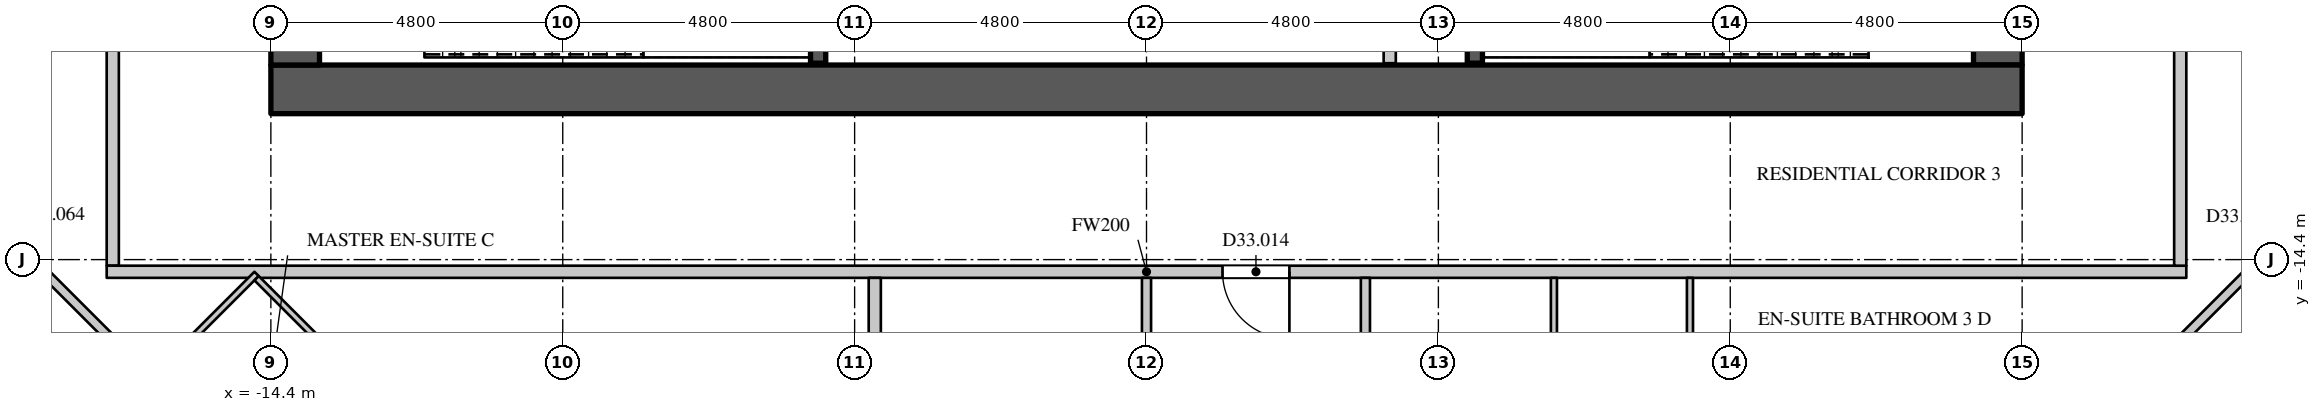
"""IFC4 building model, lengths in metres.
Left out: names, types, materials, properties, quantities, classifications, styles, units other than length and angle.
Written with IfcOpenShell. Run it as: python <this file> out.ifc"""

import sys

from ifc_helpers import new_model, si_unit, direction, frame, frame_2d, origin, place, context, subcontext, project, spatial, rectangle, extrude, element, fill, save


model = new_model("IFC4")
c1 = context("Model", 3, precision=1e-05, world=origin(), true_north=direction((0.0, 1.0)))
c2 = subcontext(c1, "Body", "Model", "MODEL_VIEW")
j1 = project(units=[si_unit("LENGTHUNIT", "METRE"), si_unit("PLANEANGLEUNIT", "RADIAN")], contexts=[c1])
p1 = place(None, origin())
s1 = spatial("IfcSite", under=j1, at=p1, CompositionType="ELEMENT")
p2 = place(p1, origin())
s2 = spatial("IfcBuilding", under=s1, at=p2, CompositionType="ELEMENT")
p3 = place(p2, frame((0.0, 0.0, 144.3)))
s3 = spatial("IfcBuildingStorey", under=s2, at=p3, CompositionType="ELEMENT", Elevation=144.3)
p4 = place(p3, frame((-14.4, -11.6, 0.0), z_axis=(0.0, 0.0, 1.0), x_axis=(1.0, 0.0, 0.0)))
e1 = element("IfcWall", 1, at=p4, inside=s3, PredefinedType="SHEAR", context=c2, shape_type="SweptSolid", body=[
    extrude(rectangle(XDim=28.8, YDim=0.8, at=frame_2d((14.4, 0.0))), origin(), (0.0, 0.0, 1.0), 4.2),
])
p5 = place(p3, frame((14.0, -11.2, 0.0), z_axis=(0.0, 0.0, 1.0), x_axis=(0.0, 1.0, 0.0)))
e2 = element("IfcWall", 2, at=p5, inside=s3, PredefinedType="SHEAR", context=c2, shape_type="SweptSolid", body=[
    extrude(rectangle(XDim=22.4, YDim=0.8, at=frame_2d((11.2, 0.0))), origin(), (0.0, 0.0, 1.0), 4.2),
])
p6 = place(p5, frame((20.25, 0.0, 0.0)))
e3 = element("IfcOpeningElement", 3, at=p6, cuts=e2, PredefinedType="OPENING", context=c2, shape_type="SweptSolid", body=[
    extrude(rectangle(XDim=1.1, YDim=2.2, at=frame_2d((0.55, 1.1))), frame((0.0, 0.41, 0.0), z_axis=(0.0, -1.0, 0.0), x_axis=(1.0, 0.0, 0.0)), (0.0, 0.0, 1.0), 0.82),
])
p7 = place(p5, frame((1.05, 0.0, 0.0)))
e4 = element("IfcOpeningElement", 4, at=p7, cuts=e2, PredefinedType="OPENING", context=c2, shape_type="SweptSolid", body=[
    extrude(rectangle(XDim=1.1, YDim=2.2, at=frame_2d((0.55, 1.1))), frame((0.0, 0.41, 0.0), z_axis=(0.0, -1.0, 0.0), x_axis=(1.0, 0.0, 0.0)), (0.0, 0.0, 1.0), 0.82),
])
p8 = place(p5, frame((14.75, 0.0, 0.0)))
e5 = element("IfcOpeningElement", 5, at=p8, cuts=e2, PredefinedType="OPENING", context=c2, shape_type="SweptSolid", body=[
    extrude(rectangle(XDim=1.5, YDim=2.4, at=frame_2d((0.75, 1.2))), frame((0.0, 0.41, 0.0), z_axis=(0.0, -1.0, 0.0), x_axis=(1.0, 0.0, 0.0)), (0.0, 0.0, 1.0), 0.82),
])
p9 = place(p5, frame((6.15, 0.0, 0.0)))
e6 = element("IfcOpeningElement", 6, at=p9, cuts=e2, PredefinedType="OPENING", context=c2, shape_type="SweptSolid", body=[
    extrude(rectangle(XDim=1.5, YDim=2.4, at=frame_2d((0.75, 1.2))), frame((0.0, 0.41, 0.0), z_axis=(0.0, -1.0, 0.0), x_axis=(1.0, 0.0, 0.0)), (0.0, 0.0, 1.0), 0.82),
])
p10 = place(p3, frame((-14.0, -11.2, 0.0), z_axis=(0.0, 0.0, 1.0), x_axis=(0.0, 1.0, 0.0)))
e7 = element("IfcWall", 7, at=p10, inside=s3, PredefinedType="SHEAR", context=c2, shape_type="SweptSolid", body=[
    extrude(rectangle(XDim=22.4, YDim=0.8, at=frame_2d((11.2, 0.0))), origin(), (0.0, 0.0, 1.0), 4.2),
])
p11 = place(p10, frame((20.25, 0.0, 0.0)))
e8 = element("IfcOpeningElement", 8, at=p11, cuts=e7, PredefinedType="OPENING", context=c2, shape_type="SweptSolid", body=[
    extrude(rectangle(XDim=1.1, YDim=2.2, at=frame_2d((0.55, 1.1))), frame((0.0, 0.41, 0.0), z_axis=(0.0, -1.0, 0.0), x_axis=(1.0, 0.0, 0.0)), (0.0, 0.0, 1.0), 0.82),
])
p12 = place(p10, frame((1.05, 0.0, 0.0)))
e9 = element("IfcOpeningElement", 9, at=p12, cuts=e7, PredefinedType="OPENING", context=c2, shape_type="SweptSolid", body=[
    extrude(rectangle(XDim=1.1, YDim=2.2, at=frame_2d((0.55, 1.1))), frame((0.0, 0.41, 0.0), z_axis=(0.0, -1.0, 0.0), x_axis=(1.0, 0.0, 0.0)), (0.0, 0.0, 1.0), 0.82),
])
p13 = place(p10, frame((15.95, 0.0, 0.0)))
e10 = element("IfcOpeningElement", 10, at=p13, cuts=e7, PredefinedType="OPENING", context=c2, shape_type="SweptSolid", body=[
    extrude(rectangle(XDim=1.5, YDim=2.4, at=frame_2d((0.75, 1.2))), frame((0.0, 0.41, 0.0), z_axis=(0.0, -1.0, 0.0), x_axis=(1.0, 0.0, 0.0)), (0.0, 0.0, 1.0), 0.82),
])
p14 = place(p10, frame((4.95, 0.0, 0.0)))
e11 = element("IfcOpeningElement", 11, at=p14, cuts=e7, PredefinedType="OPENING", context=c2, shape_type="SweptSolid", body=[
    extrude(rectangle(XDim=1.5, YDim=2.4, at=frame_2d((0.75, 1.2))), frame((0.0, 0.41, 0.0), z_axis=(0.0, -1.0, 0.0), x_axis=(1.0, 0.0, 0.0)), (0.0, 0.0, 1.0), 0.82),
])
p15 = place(p3, frame((-17.0, -14.5, 0.0), z_axis=(0.0, 0.0, 1.0), x_axis=(0.0, 1.0, 0.0)))
e12 = element("IfcWall", 12, at=p15, inside=s3, PredefinedType="PARTITIONING", context=c2, shape_type="SweptSolid", body=[
    extrude(rectangle(XDim=29.0, YDim=0.2, at=frame_2d((14.5, 0.0))), origin(), (0.0, 0.0, 1.0), 3.798),
])
p16 = place(p15, frame((13.9, 0.0, 0.0)))
e13 = element("IfcOpeningElement", 13, at=p16, cuts=e12, PredefinedType="OPENING", context=c2, shape_type="SweptSolid", body=[
    extrude(rectangle(XDim=1.1, YDim=2.4, at=frame_2d((0.55, 1.2))), frame((0.0, 0.11, 0.0), z_axis=(0.0, -1.0, 0.0), x_axis=(1.0, 0.0, 0.0)), (0.0, 0.0, 1.0), 0.22),
])
p17 = place(p3, frame((-17.1, -14.6, 0.0), z_axis=(0.0, 0.0, 1.0), x_axis=(1.0, 0.0, 0.0)))
e14 = element("IfcWall", 14, at=p17, inside=s3, PredefinedType="PARTITIONING", context=c2, shape_type="SweptSolid", body=[
    extrude(rectangle(XDim=34.2, YDim=0.2, at=frame_2d((17.1, 0.0))), origin(), (0.0, 0.0, 1.0), 3.798),
])
p18 = place(p17, frame((18.35, 0.0, 0.0)))
e15 = element("IfcOpeningElement", 15, at=p18, cuts=e14, PredefinedType="OPENING", context=c2, shape_type="SweptSolid", body=[
    extrude(rectangle(XDim=1.1, YDim=2.4, at=frame_2d((0.55, 1.2))), frame((0.0, 0.11, 0.0), z_axis=(0.0, -1.0, 0.0), x_axis=(1.0, 0.0, 0.0)), (0.0, 0.0, 1.0), 0.22),
])
p19 = place(p3, frame((17.0, -14.5, 0.0), z_axis=(0.0, 0.0, 1.0), x_axis=(0.0, 1.0, 0.0)))
e16 = element("IfcWall", 16, at=p19, inside=s3, PredefinedType="PARTITIONING", context=c2, shape_type="SweptSolid", body=[
    extrude(rectangle(XDim=29.0, YDim=0.2, at=frame_2d((14.5, 0.0))), origin(), (0.0, 0.0, 1.0), 3.798),
])
p20 = place(p19, frame((15.9, 0.0, 0.0)))
e17 = element("IfcOpeningElement", 17, at=p20, cuts=e16, PredefinedType="OPENING", context=c2, shape_type="SweptSolid", body=[
    extrude(rectangle(XDim=1.1, YDim=2.4, at=frame_2d((0.55, 1.2))), frame((0.0, 0.11, 0.0), z_axis=(0.0, -1.0, 0.0), x_axis=(1.0, 0.0, 0.0)), (0.0, 0.0, 1.0), 0.22),
])
p21 = place(p3, frame((-21.347, -11.388, 0.0), z_axis=(0.0, 0.0, 1.0), x_axis=(0.707106781187, -0.707106781187, 0.0)))
e18 = element("IfcWall", 18, at=p21, inside=s3, PredefinedType="PARTITIONING", context=c2, shape_type="SweptSolid", body=[
    extrude(rectangle(XDim=6.967, YDim=0.15, at=frame_2d((3.483, 0.0))), origin(), (0.0, 0.0, 1.0), 3.798),
])
p22 = place(p21, frame((2.75, 0.0, 0.0)))
e19 = element("IfcOpeningElement", 19, at=p22, cuts=e18, PredefinedType="OPENING", context=c2, shape_type="SweptSolid", body=[
    extrude(rectangle(XDim=0.95, YDim=2.2, at=frame_2d((0.475, 1.1))), frame((0.0, 0.085, 0.0), z_axis=(0.0, -1.0, 0.0), x_axis=(1.0, 0.0, 0.0)), (0.0, 0.0, 1.0), 0.17),
])
p23 = place(p3, frame((0.0, -26.455, 0.0), z_axis=(0.0, 0.0, 1.0), x_axis=(0.0, 1.0, 0.0)))
e20 = element("IfcWall", 20, at=p23, inside=s3, PredefinedType="PARTITIONING", context=c2, shape_type="SweptSolid", body=[
    extrude(rectangle(XDim=11.755, YDim=0.15, at=frame_2d((5.877, 0.0))), origin(), (0.0, 0.0, 1.0), 3.798),
])
p24 = place(p23, frame((8.3, 0.0, 0.0)))
e21 = element("IfcOpeningElement", 21, at=p24, cuts=e20, PredefinedType="OPENING", context=c2, shape_type="SweptSolid", body=[
    extrude(rectangle(XDim=0.95, YDim=2.2, at=frame_2d((0.475, 1.1))), frame((0.0, 0.085, 0.0), z_axis=(0.0, -1.0, 0.0), x_axis=(1.0, 0.0, 0.0)), (0.0, 0.0, 1.0), 0.17),
])
p25 = place(p3, frame((3.6, -20.725, 0.0), z_axis=(0.0, 0.0, 1.0), x_axis=(0.0, 1.0, 0.0)))
e22 = element("IfcWall", 22, at=p25, inside=s3, PredefinedType="PARTITIONING", context=c2, shape_type="SweptSolid", body=[
    extrude(rectangle(XDim=6.025, YDim=0.15, at=frame_2d((3.013, 0.0))), origin(), (0.0, 0.0, 1.0), 3.798),
])
p26 = place(p25, frame((2.55, 0.0, 0.0)))
e23 = element("IfcOpeningElement", 23, at=p26, cuts=e22, PredefinedType="OPENING", context=c2, shape_type="SweptSolid", body=[
    extrude(rectangle(XDim=0.95, YDim=2.2, at=frame_2d((0.475, 1.1))), frame((0.0, 0.085, 0.0), z_axis=(0.0, -1.0, 0.0), x_axis=(1.0, 0.0, 0.0)), (0.0, 0.0, 1.0), 0.17),
])
p27 = place(p3, frame((15.099, -17.636, 0.0), z_axis=(0.0, 0.0, 1.0), x_axis=(0.707106781187, 0.707106781187, 0.0)))
e24 = element("IfcWall", 24, at=p27, inside=s3, PredefinedType="PARTITIONING", context=c2, shape_type="SweptSolid", body=[
    extrude(rectangle(XDim=8.986, YDim=0.15, at=frame_2d((4.493, 0.0))), origin(), (0.0, 0.0, 1.0), 3.798),
])
p28 = place(p27, frame((0.4, 0.0, 0.0)))
e25 = element("IfcOpeningElement", 25, at=p28, cuts=e24, PredefinedType="OPENING", context=c2, shape_type="SweptSolid", body=[
    extrude(rectangle(XDim=0.95, YDim=2.2, at=frame_2d((0.475, 1.1))), frame((0.0, 0.085, 0.0), z_axis=(0.0, -1.0, 0.0), x_axis=(1.0, 0.0, 0.0)), (0.0, 0.0, 1.0), 0.17),
])
p29 = place(p27, frame((5.1, 0.0, 0.0)))
e26 = element("IfcOpeningElement", 26, at=p29, cuts=e24, PredefinedType="OPENING", context=c2, shape_type="SweptSolid", body=[
    extrude(rectangle(XDim=0.95, YDim=2.2, at=frame_2d((0.475, 1.1))), frame((0.0, 0.085, 0.0), z_axis=(0.0, -1.0, 0.0), x_axis=(1.0, 0.0, 0.0)), (0.0, 0.0, 1.0), 0.17),
])
p30 = place(p27, frame((7.85, 0.0, 0.0)))
e27 = element("IfcOpeningElement", 27, at=p30, cuts=e24, PredefinedType="OPENING", context=c2, shape_type="SweptSolid", body=[
    extrude(rectangle(XDim=0.95, YDim=2.2, at=frame_2d((0.475, 1.1))), frame((0.0, 0.085, 0.0), z_axis=(0.0, -1.0, 0.0), x_axis=(1.0, 0.0, 0.0)), (0.0, 0.0, 1.0), 0.17),
])
p31 = place(p3, frame((-4.469, -25.65, 0.0), z_axis=(0.0, 0.0, 1.0), x_axis=(0.0, 1.0, 0.0)))
e28 = element("IfcWall", 28, at=p31, inside=s3, PredefinedType="PARTITIONING", context=c2, shape_type="SweptSolid", body=[
    extrude(rectangle(XDim=10.95, YDim=0.2, at=frame_2d((5.475, 0.0))), origin(), (0.0, 0.0, 1.0), 3.15),
])
p32 = place(p3, frame((4.0, -11.17, 0.0), z_axis=(0.0, 0.0, 1.0), x_axis=(0.0, 1.0, 0.0)))
e29 = element("IfcWall", 29, at=p32, inside=s3, PredefinedType="PARTITIONING", context=c2, shape_type="SweptSolid", body=[
    extrude(rectangle(XDim=5.27, YDim=0.2, at=frame_2d((2.635, 0.0))), origin(), (0.0, 0.0, 1.0), 3.798),
])
for number, where, z_axis, x_axis in (
    (30, (-5.4, -11.17, 0.0), (0.0, 0.0, 1.0), (0.0, 1.0, 0.0)),
    (31, (5.4, -11.17, 0.0), (0.0, 0.0, 1.0), (0.0, 1.0, 0.0)),
):
    element("IfcWall", number, at=place(p3, frame(where, z_axis=z_axis, x_axis=x_axis)), inside=s3, PredefinedType="SHEAR", context=c2, shape_type="SweptSolid", body=[
        extrude(rectangle(XDim=2.845, YDim=0.25, at=frame_2d((1.422, 0.0))), origin(), (0.0, 0.0, 1.0), 3.798),
    ])
p33 = place(p3, frame((-15.929, -15.929, 0.0), z_axis=(0.0, 0.0, 1.0), x_axis=(0.707106781187, 0.707106781187, 0.0)))
e32 = element("IfcWall", 32, at=p33, inside=s3, PredefinedType="PARTITIONING", context=c2, shape_type="SweptSolid", body=[
    extrude(rectangle(XDim=1.83, YDim=0.1, at=frame_2d((0.915, 0.0))), origin(), (0.0, 0.0, 1.0), 3.798),
])
p34 = place(p3, frame((-14.635, -14.706, 0.0), z_axis=(0.0, 0.0, 1.0), x_axis=(0.707106781187, -0.707106781187, 0.0)))
e33 = element("IfcWall", 33, at=p34, inside=s3, PredefinedType="PARTITIONING", context=c2, shape_type="SweptSolid", body=[
    extrude(rectangle(XDim=2.6, YDim=0.1, at=frame_2d((1.3, 0.0))), origin(), (0.0, 0.0, 1.0), 3.798),
])
p35 = place(p3, frame((6.7, -20.725, 0.0), z_axis=(0.0, 0.0, 1.0), x_axis=(0.0, 1.0, 0.0)))
e34 = element("IfcWall", 34, at=p35, inside=s3, PredefinedType="PARTITIONING", context=c2, shape_type="SweptSolid", body=[
    extrude(rectangle(XDim=6.025, YDim=0.1, at=frame_2d((3.013, 0.0))), origin(), (0.0, 0.0, 1.0), 3.798),
])
p36 = place(p3, frame((8.937, -20.82, 0.0), z_axis=(0.0, 0.0, 1.0), x_axis=(0.0, 1.0, 0.0)))
e35 = element("IfcWall", 35, at=p36, inside=s3, PredefinedType="PARTITIONING", context=c2, shape_type="SweptSolid", body=[
    extrude(rectangle(XDim=6.12, YDim=0.1, at=frame_2d((3.06, 0.0))), origin(), (0.0, 0.0, 1.0), 3.798),
])
p37 = place(p36, frame((2.65, 0.0, 0.0)))
e36 = element("IfcOpeningElement", 36, at=p37, cuts=e35, PredefinedType="OPENING", context=c2, shape_type="SweptSolid", body=[
    extrude(rectangle(XDim=0.9, YDim=2.2, at=frame_2d((0.45, 1.1))), frame((0.0, 0.06, 0.0), z_axis=(0.0, -1.0, 0.0), x_axis=(1.0, 0.0, 0.0)), (0.0, 0.0, 1.0), 0.12),
])
p38 = place(p18, origin())
e37 = element("IfcDoor", 37, at=p38, inside=s3, OperationType="SINGLE_SWING_LEFT", PredefinedType="DOOR", context=c2, shape_type="SweptSolid", body=[
    extrude(rectangle(XDim=1.1, YDim=2.4, at=frame_2d((0.55, 1.2))), frame((0.0, 0.025, 0.0), z_axis=(0.0, -1.0, 0.0), x_axis=(1.0, 0.0, 0.0)), (0.0, 0.0, 1.0), 0.05),
])
fill(e15, e37)
save(model, sys.argv[1])
